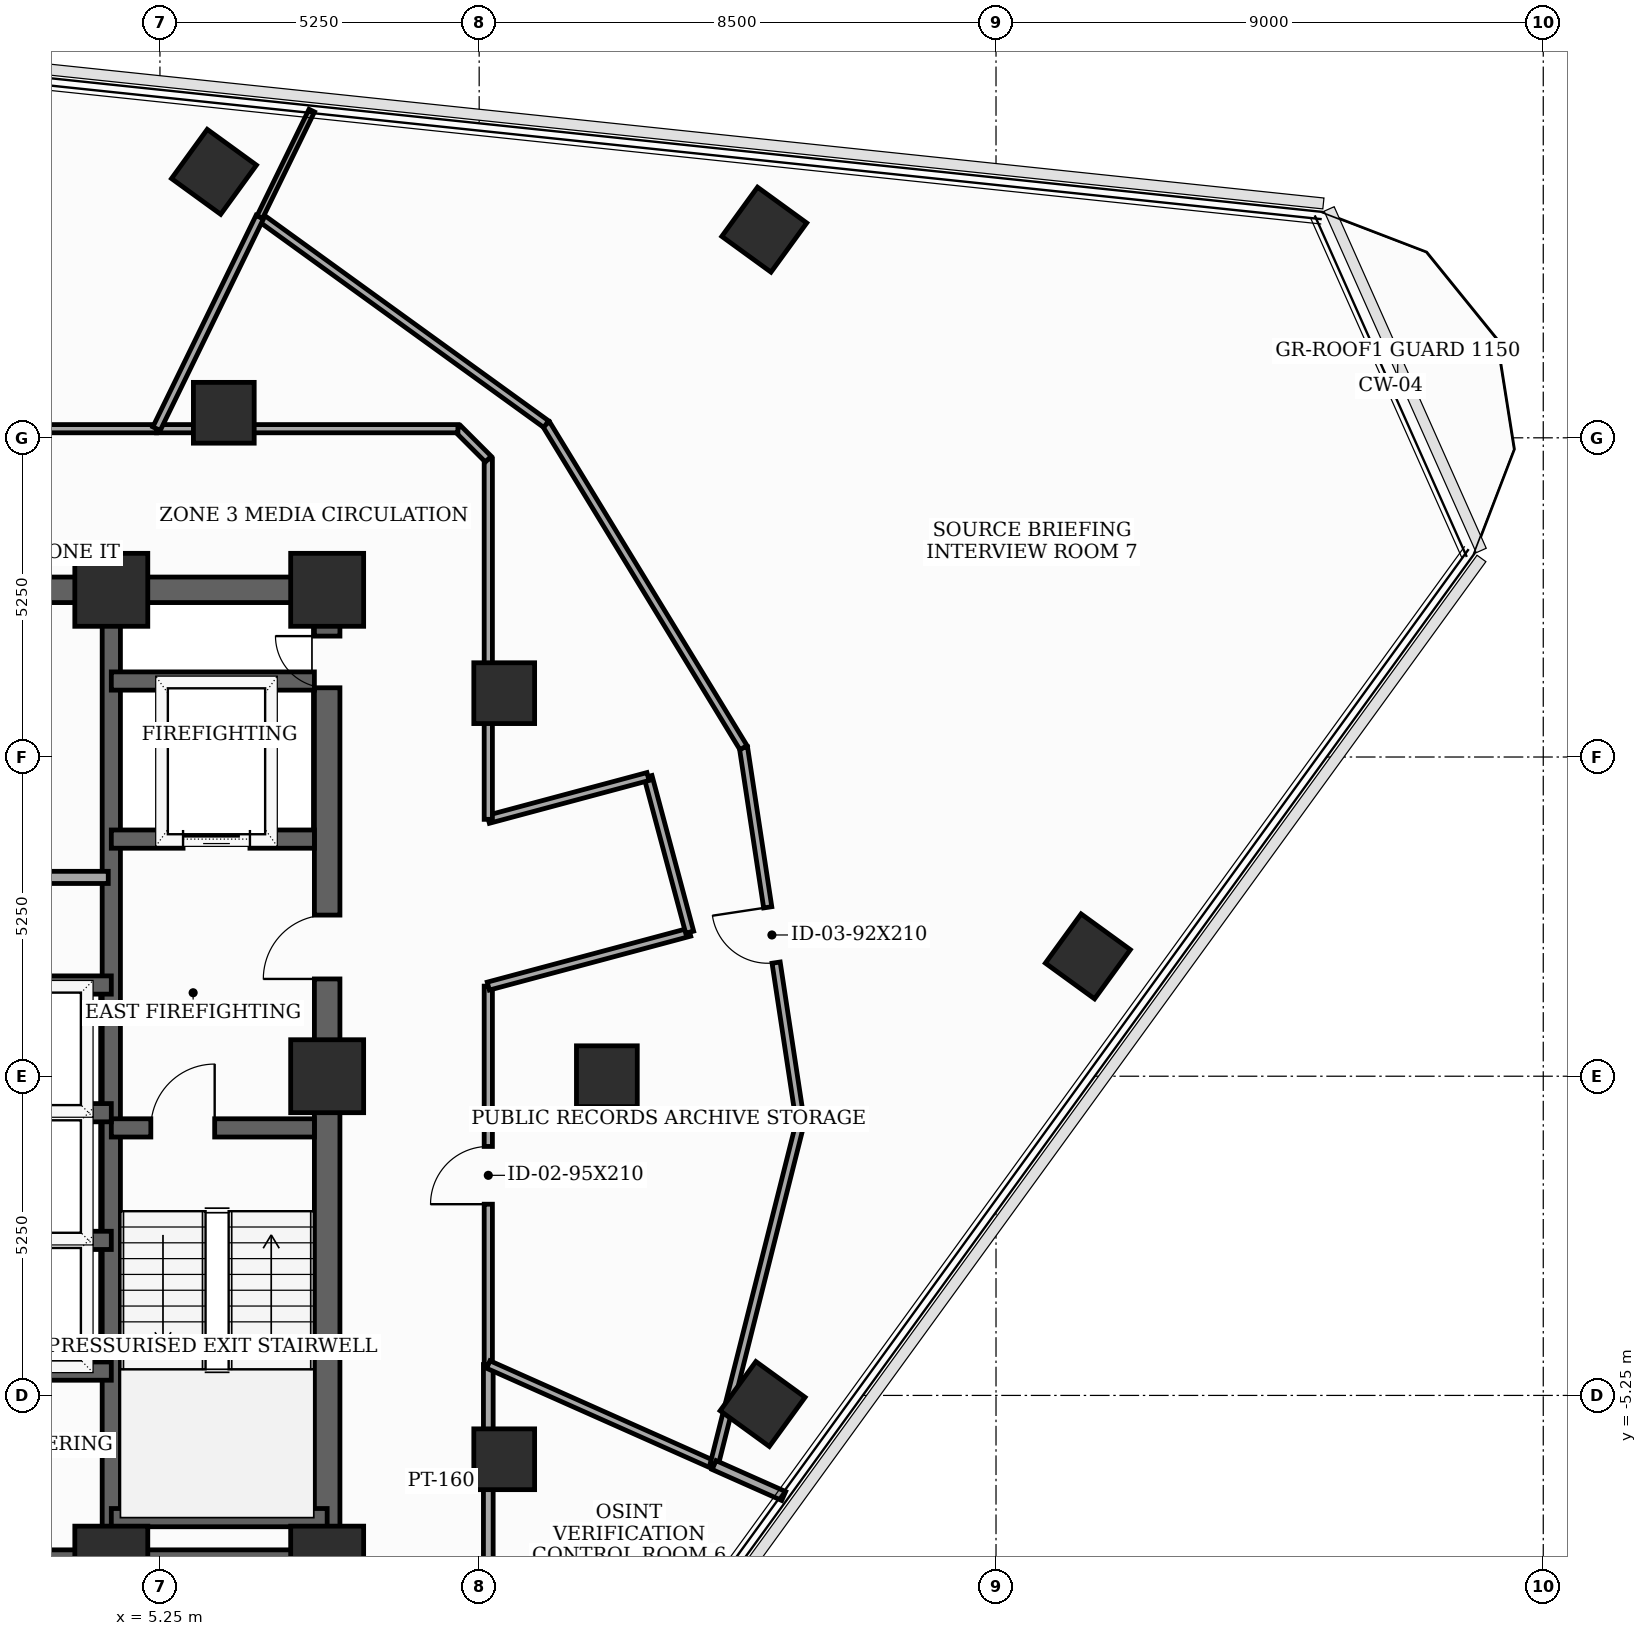
"""IFC4 building model, lengths in metres.
Left out: names, types, materials, properties, quantities, classifications, styles, units other than length and angle.
Written with IfcOpenShell. Run it as: python <this file> out.ifc"""

import sys

from ifc_helpers import new_model, si_unit, direction, frame, frame_2d, origin, origin_2d, place, context, subcontext, project, spatial, rectangle, extrude, element, fill, save


model = new_model("IFC4")
c1 = context("Model", 3, precision=1e-05, world=origin(), true_north=direction((0.0, 1.0)))
c2 = subcontext(c1, "Body", "Model", "MODEL_VIEW")
j1 = project(units=[si_unit("LENGTHUNIT", "METRE"), si_unit("PLANEANGLEUNIT", "RADIAN")], contexts=[c1])
p1 = place(None, origin())
s1 = spatial("IfcSite", under=j1, at=p1, CompositionType="ELEMENT")
p2 = place(p1, origin())
s2 = spatial("IfcBuilding", under=s1, at=p2, CompositionType="ELEMENT")
p3 = place(p2, frame((0.0, 0.0, 233.7)))
s3 = spatial("IfcBuildingStorey", under=s2, at=p3, CompositionType="ELEMENT", Elevation=233.7)
for number, where, z_axis, x_axis in (
    (1, (4.45, -8.0, 0.0), (0.0, 0.0, 1.0), (1.0, 0.0, 0.0)),
    (2, (8.0, -8.0, 0.0), (0.0, 0.0, 1.0), (1.0, 0.0, 0.0)),
    (3, (8.0, 0.0, 0.0), (0.0, 0.0, 1.0), (1.0, 0.0, 0.0)),
    (4, (8.0, 8.0, 0.0), (0.0, 0.0, 1.0), (1.0, 0.0, 0.0)),
    (5, (4.45, 8.0, 0.0), (0.0, 0.0, 1.0), (1.0, 0.0, 0.0)),
):
    element("IfcColumn", number, at=place(p3, frame(where, z_axis=z_axis, x_axis=x_axis)), inside=s3, PredefinedType="COLUMN", context=c2, shape_type="SweptSolid", body=[
        extrude(rectangle(XDim=1.2, YDim=1.2, at=origin_2d()), origin(), (0.0, 0.0, 1.0), 3.7),
    ])
for number, where, z_axis, x_axis in (
    (6, (12.6, 0.0, 0.0), (0.0, 0.0, 1.0), (1.0, 0.0, 0.0)),
    (7, (10.912, 6.3, 0.0), (0.0, 0.0, 1.0), (1.0, 0.0, 0.0)),
    (8, (6.3, 10.912, 0.0), (0.0, 0.0, 1.0), (1.0, 0.0, 0.0)),
    (9, (10.912, -6.3, 0.0), (0.0, 0.0, 1.0), (1.0, 0.0, 0.0)),
    (10, (15.161, -5.391, 0.0), (0.0, 0.0, 1.0), (0.588, 0.809, 0.0)),
    (11, (20.51, 1.971, 0.0), (0.0, 0.0, 1.0), (0.588, 0.809, 0.0)),
    (12, (15.188, 13.923, 0.0), (0.0, 0.0, 1.0), (0.588, 0.809, 0.0)),
    (13, (6.138, 14.875, 0.0), (0.0, 0.0, 1.0), (0.588, 0.809, 0.0)),
):
    element("IfcColumn", number, at=place(p3, frame(where, z_axis=z_axis, x_axis=x_axis)), inside=s3, PredefinedType="COLUMN", context=c2, shape_type="SweptSolid", body=[
        extrude(rectangle(XDim=1.0, YDim=1.0, at=origin_2d()), origin(), (0.0, 0.0, 1.0), 3.7),
    ])
p4 = place(p3, frame((8.0, -8.0, 0.0), z_axis=(0.0, 0.0, 1.0), x_axis=(0.0, 1.0, 0.0)))
e14 = element("IfcWall", 14, at=p4, inside=s3, PredefinedType="SHEAR", context=c2, shape_type="SweptSolid", body=[
    extrude(rectangle(XDim=16.0, YDim=0.42, at=frame_2d((8.0, 0.0))), origin(), (0.0, 0.0, 1.0), 3.5),
])
p5 = place(p4, frame((9.6, 0.0, 0.0)))
e15 = element("IfcOpeningElement", 15, at=p5, cuts=e14, PredefinedType="OPENING", context=c2, shape_type="SweptSolid", body=[
    extrude(rectangle(XDim=1.05, YDim=2.15, at=frame_2d((0.525, 1.075))), frame((0.0, 0.22, 0.0), z_axis=(0.0, -1.0, 0.0), x_axis=(1.0, 0.0, 0.0)), (0.0, 0.0, 1.0), 0.44),
])
p6 = place(p4, frame((14.389, 0.0, 0.0)))
e16 = element("IfcOpeningElement", 16, at=p6, cuts=e14, PredefinedType="OPENING", context=c2, shape_type="SweptSolid", body=[
    extrude(rectangle(XDim=0.85, YDim=2.02, at=frame_2d((0.425, 1.01))), frame((0.0, 0.22, 0.0), z_axis=(0.0, -1.0, 0.0), x_axis=(1.0, 0.0, 0.0)), (0.0, 0.0, 1.0), 0.44),
])
p7 = place(p3, frame((-8.0, -8.0, 0.0), z_axis=(0.0, 0.0, 1.0), x_axis=(1.0, 0.0, 0.0)))
e17 = element("IfcWall", 17, at=p7, inside=s3, PredefinedType="SHEAR", context=c2, shape_type="SweptSolid", body=[
    extrude(rectangle(XDim=16.0, YDim=0.42, at=frame_2d((8.0, 0.0))), origin(), (0.0, 0.0, 1.0), 3.5),
])
p8 = place(p7, frame((4.6, 0.0, 0.0)))
e18 = element("IfcOpeningElement", 18, at=p8, cuts=e17, PredefinedType="OPENING", context=c2, shape_type="SweptSolid", body=[
    extrude(rectangle(XDim=0.95, YDim=2.1, at=frame_2d((0.475, 1.05))), frame((0.0, 0.22, 0.0), z_axis=(0.0, -1.0, 0.0), x_axis=(1.0, 0.0, 0.0)), (0.0, 0.0, 1.0), 0.44),
])
p9 = place(p7, frame((7.52, 0.0, 0.0)))
e19 = element("IfcOpeningElement", 19, at=p9, cuts=e17, PredefinedType="OPENING", context=c2, shape_type="SweptSolid", body=[
    extrude(rectangle(XDim=0.95, YDim=2.1, at=frame_2d((0.475, 1.05))), frame((0.0, 0.22, 0.0), z_axis=(0.0, -1.0, 0.0), x_axis=(1.0, 0.0, 0.0)), (0.0, 0.0, 1.0), 0.44),
])
p10 = place(p7, frame((10.45, 0.0, 0.0)))
e20 = element("IfcOpeningElement", 20, at=p10, cuts=e17, PredefinedType="OPENING", context=c2, shape_type="SweptSolid", body=[
    extrude(rectangle(XDim=0.95, YDim=2.1, at=frame_2d((0.475, 1.05))), frame((0.0, 0.22, 0.0), z_axis=(0.0, -1.0, 0.0), x_axis=(1.0, 0.0, 0.0)), (0.0, 0.0, 1.0), 0.44),
])
p11 = place(p3, frame((-8.0, 8.0, 0.0), z_axis=(0.0, 0.0, 1.0), x_axis=(1.0, 0.0, 0.0)))
e21 = element("IfcWall", 21, at=p11, inside=s3, PredefinedType="SHEAR", context=c2, shape_type="SweptSolid", body=[
    extrude(rectangle(XDim=16.0, YDim=0.42, at=frame_2d((8.0, 0.0))), origin(), (0.0, 0.0, 1.0), 3.5),
])
p12 = place(p11, frame((7.1, 0.0, 0.0)))
e22 = element("IfcOpeningElement", 22, at=p12, cuts=e21, PredefinedType="OPENING", context=c2, shape_type="SweptSolid", body=[
    extrude(rectangle(XDim=1.8, YDim=2.15, at=frame_2d((0.9, 1.075))), frame((0.0, 0.22, 0.0), z_axis=(0.0, -1.0, 0.0), x_axis=(1.0, 0.0, 0.0)), (0.0, 0.0, 1.0), 0.44),
])
p13 = place(p3, frame((4.45, -7.79, 0.0), z_axis=(0.0, 0.0, 1.0), x_axis=(0.0, 1.0, 0.0)))
e23 = element("IfcWall", 23, at=p13, inside=s3, PredefinedType="SHEAR", context=c2, shape_type="SweptSolid", body=[
    extrude(rectangle(XDim=15.58, YDim=0.3, at=frame_2d((7.79, 0.0))), origin(), (0.0, 0.0, 1.0), 3.5),
])
p14 = place(p3, frame((4.45, -0.85, 0.0), z_axis=(0.0, 0.0, 1.0), x_axis=(1.0, 0.0, 0.0)))
e24 = element("IfcWall", 24, at=p14, inside=s3, PredefinedType="SHEAR", context=c2, shape_type="SweptSolid", body=[
    extrude(rectangle(XDim=3.34, YDim=0.3, at=frame_2d((1.67, 0.0))), origin(), (0.0, 0.0, 1.0), 3.5),
])
p15 = place(p14, frame((0.65, 0.0, 0.0)))
e25 = element("IfcOpeningElement", 25, at=p15, cuts=e24, PredefinedType="OPENING", context=c2, shape_type="SweptSolid", body=[
    extrude(rectangle(XDim=1.05, YDim=2.15, at=frame_2d((0.525, 1.075))), frame((0.0, 0.16, 0.0), z_axis=(0.0, -1.0, 0.0), x_axis=(1.0, 0.0, 0.0)), (0.0, 0.0, 1.0), 0.32),
])
p16 = place(p3, frame((4.45, -7.26, 0.0), z_axis=(0.0, 0.0, 1.0), x_axis=(1.0, 0.0, 0.0)))
e26 = element("IfcWall", 26, at=p16, inside=s3, PredefinedType="SHEAR", context=c2, shape_type="SweptSolid", body=[
    extrude(rectangle(XDim=3.55, YDim=0.3, at=frame_2d((1.775, 0.0))), origin(), (0.0, 0.0, 1.0), 3.5),
])
p17 = place(p3, frame((4.45, 3.9, 0.0), z_axis=(0.0, 0.0, 1.0), x_axis=(1.0, 0.0, 0.0)))
e27 = element("IfcWall", 27, at=p17, inside=s3, PredefinedType="SHEAR", context=c2, shape_type="SweptSolid", body=[
    extrude(rectangle(XDim=3.34, YDim=0.3, at=frame_2d((1.67, 0.0))), origin(), (0.0, 0.0, 1.0), 3.5),
])
p18 = place(p17, frame((1.18, 0.0, 0.0)))
e28 = element("IfcOpeningElement", 28, at=p18, cuts=e27, PredefinedType="OPENING", context=c2, shape_type="SweptSolid", body=[
    extrude(rectangle(XDim=1.1, YDim=2.1, at=frame_2d((0.55, 1.05))), frame((0.0, 0.16, 0.0), z_axis=(0.0, -1.0, 0.0), x_axis=(1.0, 0.0, 0.0)), (0.0, 0.0, 1.0), 0.32),
])
p19 = place(p3, frame((4.45, 6.5, 0.0), z_axis=(0.0, 0.0, 1.0), x_axis=(1.0, 0.0, 0.0)))
e29 = element("IfcWall", 29, at=p19, inside=s3, PredefinedType="SHEAR", context=c2, shape_type="SweptSolid", body=[
    extrude(rectangle(XDim=3.34, YDim=0.3, at=frame_2d((1.67, 0.0))), origin(), (0.0, 0.0, 1.0), 3.5),
])
p20 = place(p3, frame((-4.45, -4.85, 0.0), z_axis=(0.0, 0.0, 1.0), x_axis=(1.0, 0.0, 0.0)))
e30 = element("IfcWall", 30, at=p20, inside=s3, PredefinedType="SHEAR", context=c2, shape_type="SweptSolid", body=[
    extrude(rectangle(XDim=8.9, YDim=0.3, at=frame_2d((4.45, 0.0))), origin(), (0.0, 0.0, 1.0), 3.5),
])
for number, where, z_axis, x_axis in (
    (31, (1.68, 1.5, 0.0), (0.0, 0.0, 1.0), (1.0, 0.0, 0.0)),
    (32, (1.68, -2.7, 0.0), (0.0, 0.0, 1.0), (1.0, 0.0, 0.0)),
    (33, (1.68, -0.6, 0.0), (0.0, 0.0, 1.0), (1.0, 0.0, 0.0)),
):
    element("IfcWall", number, at=place(p3, frame(where, z_axis=z_axis, x_axis=x_axis)), inside=s3, PredefinedType="SHEAR", context=c2, shape_type="SweptSolid", body=[
        extrude(rectangle(XDim=2.77, YDim=0.3, at=frame_2d((1.385, 0.0))), origin(), (0.0, 0.0, 1.0), 3.5),
    ])
p21 = place(p3, frame((1.72, 3.27, 0.0), z_axis=(0.0, 0.0, 1.0), x_axis=(1.0, 0.0, 0.0)))
e34 = element("IfcWall", 34, at=p21, inside=s3, PredefinedType="SOLIDWALL", context=c2, shape_type="SweptSolid", body=[
    extrude(rectangle(XDim=2.68, YDim=0.2, at=frame_2d((1.34, 0.0))), origin(), (0.0, 0.0, 1.0), 3.5),
])
p22 = place(p3, frame((10.65, -4.742, 0.0), z_axis=(0.0, 0.0, 1.0), x_axis=(0.0, 1.0, 0.0)))
e35 = element("IfcWall", 35, at=p22, inside=s3, PredefinedType="PARTITIONING", context=c2, shape_type="SweptSolid", body=[
    extrude(rectangle(XDim=6.224, YDim=0.135, at=frame_2d((3.112, 0.0))), origin(), (0.0, 0.0, 1.0), 2.885),
])
p23 = place(p22, frame((2.637, 0.0, 0.0)))
e36 = element("IfcOpeningElement", 36, at=p23, cuts=e35, PredefinedType="OPENING", context=c2, shape_type="SweptSolid", body=[
    extrude(rectangle(XDim=0.95, YDim=2.1, at=frame_2d((0.475, 1.05))), frame((0.0, 0.077, 0.0), z_axis=(0.0, -1.0, 0.0), x_axis=(1.0, 0.0, 0.0)), (0.0, 0.0, 1.0), 0.155),
])
p24 = place(p3, frame((10.65, 1.482, 0.0), z_axis=(0.0, 0.0, 1.0), x_axis=(0.965961397105, 0.2586862565, 0.0)))
e37 = element("IfcWall", 37, at=p24, inside=s3, PredefinedType="PARTITIONING", context=c2, shape_type="SweptSolid", body=[
    extrude(rectangle(XDim=3.429, YDim=0.135, at=frame_2d((1.714, 0.0))), origin(), (0.0, 0.0, 1.0), 2.885),
])
p25 = place(p3, frame((13.962, 2.369, 0.0), z_axis=(0.0, 0.0, 1.0), x_axis=(-0.258413725385, 0.966034340245, 0.0)))
e38 = element("IfcWall", 38, at=p25, inside=s3, PredefinedType="PARTITIONING", context=c2, shape_type="SweptSolid", body=[
    extrude(rectangle(XDim=2.65, YDim=0.135, at=frame_2d((1.325, 0.0))), origin(), (0.0, 0.0, 1.0), 3.5),
])
p26 = place(p3, frame((13.277, 4.929, 0.0), z_axis=(0.0, 0.0, 1.0), x_axis=(-0.965934830229, -0.258785439601, 0.0)))
e39 = element("IfcWall", 39, at=p26, inside=s3, PredefinedType="PARTITIONING", context=c2, shape_type="SweptSolid", body=[
    extrude(rectangle(XDim=2.72, YDim=0.135, at=frame_2d((1.36, 0.0))), origin(), (0.0, 0.0, 1.0), 2.885),
])
p27 = place(p3, frame((10.65, 4.225, 0.0), z_axis=(0.0, 0.0, 1.0), x_axis=(0.0, 1.0, 0.0)))
e40 = element("IfcWall", 40, at=p27, inside=s3, PredefinedType="PARTITIONING", context=c2, shape_type="SweptSolid", body=[
    extrude(rectangle(XDim=5.925, YDim=0.135, at=frame_2d((2.962, 0.0))), origin(), (0.0, 0.0, 1.0), 2.885),
])
p28 = place(p3, frame((10.65, 10.15, 0.0), z_axis=(0.0, 0.0, 1.0), x_axis=(-0.707106781187, 0.707106781187, 0.0)))
e41 = element("IfcWall", 41, at=p28, inside=s3, PredefinedType="PARTITIONING", context=c2, shape_type="SweptSolid", body=[
    extrude(rectangle(XDim=0.707, YDim=0.135, at=frame_2d((0.354, 0.0))), origin(), (0.0, 0.0, 1.0), 3.5),
])
p29 = place(p3, frame((10.15, 10.65, 0.0), z_axis=(0.0, 0.0, 1.0), x_axis=(-1.0, 0.0, 0.0)))
e42 = element("IfcWall", 42, at=p29, inside=s3, PredefinedType="PARTITIONING", context=c2, shape_type="SweptSolid", body=[
    extrude(rectangle(XDim=4.956, YDim=0.135, at=frame_2d((2.478, 0.0))), origin(), (0.0, 0.0, 1.0), 2.885),
])
p30 = place(p3, frame((10.65, -10.15, 0.0), z_axis=(0.0, 0.0, 1.0), x_axis=(0.0, 1.0, 0.0)))
e43 = element("IfcWall", 43, at=p30, inside=s3, PredefinedType="PARTITIONING", context=c2, shape_type="SweptSolid", body=[
    extrude(rectangle(XDim=5.408, YDim=0.16, at=frame_2d((2.704, 0.0))), origin(), (0.0, 0.0, 1.0), 2.885),
])
p31 = place(p30, frame((0.582, 0.0, 0.0)))
e44 = element("IfcOpeningElement", 44, at=p31, cuts=e43, PredefinedType="OPENING", context=c2, shape_type="SweptSolid", body=[
    extrude(rectangle(XDim=1.0, YDim=2.15, at=frame_2d((0.5, 1.075))), frame((0.0, 0.09, 0.0), z_axis=(0.0, -1.0, 0.0), x_axis=(1.0, 0.0, 0.0)), (0.0, 0.0, 1.0), 0.18),
])
p32 = place(p3, frame((5.194, 10.65, 0.0), z_axis=(0.0, 0.0, 1.0), x_axis=(-1.0, 0.0, 0.0)))
e45 = element("IfcWall", 45, at=p32, inside=s3, PredefinedType="PARTITIONING", context=c2, shape_type="SweptSolid", body=[
    extrude(rectangle(XDim=6.344, YDim=0.135, at=frame_2d((3.172, 0.0))), origin(), (0.0, 0.0, 1.0), 2.885),
])
p33 = place(p32, frame((2.372, 0.0, 0.0)))
e46 = element("IfcOpeningElement", 46, at=p33, cuts=e45, PredefinedType="OPENING", context=c2, shape_type="SweptSolid", body=[
    extrude(rectangle(XDim=1.6, YDim=2.15, at=frame_2d((0.8, 1.075))), frame((0.0, 0.077, 0.0), z_axis=(0.0, -1.0, 0.0), x_axis=(1.0, 0.0, 0.0)), (0.0, 0.0, 1.0), 0.155),
])
p34 = place(p3, frame((10.65, -4.742, 0.0), z_axis=(0.0, 0.0, 1.0), x_axis=(0.913556239153, -0.406712426544, 0.0)))
e47 = element("IfcWall", 47, at=p34, inside=s3, PredefinedType="PARTITIONING", context=c2, shape_type="SweptSolid", body=[
    extrude(rectangle(XDim=4.064, YDim=0.135, at=frame_2d((2.032, 0.0))), origin(), (0.0, 0.0, 1.0), 2.885),
])
p35 = place(p3, frame((14.363, -6.395, 0.0), z_axis=(0.0, 0.0, 1.0), x_axis=(0.244106617879, 0.969748399899, 0.0)))
e48 = element("IfcWall", 48, at=p35, inside=s3, PredefinedType="PARTITIONING", context=c2, shape_type="SweptSolid", body=[
    extrude(rectangle(XDim=5.813, YDim=0.135, at=frame_2d((2.906, 0.0))), origin(), (0.0, 0.0, 1.0), 2.985),
])
p36 = place(p3, frame((15.782, -0.758, 0.0), z_axis=(0.0, 0.0, 1.0), x_axis=(-0.150025845784, 0.988682075086, 0.0)))
e49 = element("IfcWall", 49, at=p36, inside=s3, PredefinedType="PARTITIONING", context=c2, shape_type="SweptSolid", body=[
    extrude(rectangle(XDim=6.233, YDim=0.135, at=frame_2d((3.116, 0.0))), origin(), (0.0, 0.0, 1.0), 2.985),
])
p37 = place(p36, frame((2.656, 0.0, 0.0)))
e50 = element("IfcOpeningElement", 50, at=p37, cuts=e49, PredefinedType="OPENING", context=c2, shape_type="SweptSolid", body=[
    extrude(rectangle(XDim=0.92, YDim=2.1, at=frame_2d((0.46, 1.05))), frame((0.0, 0.077, 0.0), z_axis=(0.0, -1.0, 0.0), x_axis=(1.0, 0.0, 0.0)), (0.0, 0.0, 1.0), 0.155),
])
p38 = place(p3, frame((14.847, 5.404, 0.0), z_axis=(0.0, 0.0, 1.0), x_axis=(-0.520646426704, 0.853772392597, 0.0)))
e51 = element("IfcWall", 51, at=p38, inside=s3, PredefinedType="PARTITIONING", context=c2, shape_type="SweptSolid", body=[
    extrude(rectangle(XDim=6.232, YDim=0.135, at=frame_2d((3.116, 0.0))), origin(), (0.0, 0.0, 1.0), 2.985),
])
p39 = place(p3, frame((11.602, 10.725, 0.0), z_axis=(0.0, 0.0, 1.0), x_axis=(-0.810322435649, 0.58598425771, 0.0)))
e52 = element("IfcWall", 52, at=p39, inside=s3, PredefinedType="PARTITIONING", context=c2, shape_type="SweptSolid", body=[
    extrude(rectangle(XDim=5.812, YDim=0.135, at=frame_2d((2.906, 0.0))), origin(), (0.0, 0.0, 1.0), 3.5),
])
p40 = place(p3, frame((6.892, 14.131, 0.0), z_axis=(0.0, 0.0, 1.0), x_axis=(-0.438392584888, -0.898783589923, 0.0)))
e53 = element("IfcWall", 53, at=p40, inside=s3, PredefinedType="PARTITIONING", context=c2, shape_type="SweptSolid", body=[
    extrude(rectangle(XDim=3.873, YDim=0.135, at=frame_2d((1.937, 0.0))), origin(), (0.0, 0.0, 1.0), 2.885),
])
p41 = place(p3, frame((15.508, -6.905, 0.0), z_axis=(0.0, 0.0, 1.0), x_axis=(-0.913626692327, 0.406554137929, 0.0)))
e54 = element("IfcWall", 54, at=p41, inside=s3, PredefinedType="PARTITIONING", context=c2, shape_type="SweptSolid", body=[
    extrude(rectangle(XDim=1.253, YDim=0.16, at=frame_2d((0.626, 0.0))), origin(), (0.0, 0.0, 1.0), 3.035),
])
p42 = place(p3, frame((7.747, 15.882, 0.0), z_axis=(0.0, 0.0, 1.0), x_axis=(-0.438571753549, -0.898696176129, 0.0)))
e55 = element("IfcWall", 55, at=p42, inside=s3, PredefinedType="MOVABLE", context=c2, shape_type="SweptSolid", body=[
    extrude(rectangle(XDim=1.948, YDim=0.1, at=frame_2d((0.974, 0.0))), origin(), (0.0, 0.0, 1.0), 3.035),
])
p43 = place(p5, origin())
e56 = element("IfcDoor", 56, at=p43, inside=s3, OperationType="SINGLE_SWING_LEFT", PredefinedType="DOOR", context=c2, shape_type="SweptSolid", body=[
    extrude(rectangle(XDim=1.05, YDim=2.15, at=frame_2d((0.525, 1.075))), frame((0.0, 0.025, 0.0), z_axis=(0.0, -1.0, 0.0), x_axis=(1.0, 0.0, 0.0)), (0.0, 0.0, 1.0), 0.05),
])
fill(e15, e56)
p44 = place(p6, origin())
e57 = element("IfcDoor", 57, at=p44, inside=s3, OperationType="SINGLE_SWING_RIGHT", PredefinedType="TRAPDOOR", context=c2, shape_type="SweptSolid", body=[
    extrude(rectangle(XDim=0.85, YDim=2.02, at=frame_2d((0.425, 1.01))), frame((0.0, 0.025, 0.0), z_axis=(0.0, -1.0, 0.0), x_axis=(1.0, 0.0, 0.0)), (0.0, 0.0, 1.0), 0.05),
])
fill(e16, e57)
p45 = place(p15, origin())
e58 = element("IfcDoor", 58, at=p45, inside=s3, OperationType="SINGLE_SWING_RIGHT", PredefinedType="DOOR", context=c2, shape_type="SweptSolid", body=[
    extrude(rectangle(XDim=1.05, YDim=2.15, at=frame_2d((0.525, 1.075))), frame((0.0, 0.025, 0.0), z_axis=(0.0, -1.0, 0.0), x_axis=(1.0, 0.0, 0.0)), (0.0, 0.0, 1.0), 0.05),
])
fill(e25, e58)
p46 = place(p18, origin())
e59 = element("IfcDoor", 59, at=p46, inside=s3, OperationType="SLIDING_TO_LEFT", PredefinedType="DOOR", context=c2, shape_type="SweptSolid", body=[
    extrude(rectangle(XDim=1.1, YDim=2.1, at=frame_2d((0.55, 1.05))), frame((0.0, 0.025, 0.0), z_axis=(0.0, -1.0, 0.0), x_axis=(1.0, 0.0, 0.0)), (0.0, 0.0, 1.0), 0.05),
])
fill(e28, e59)
p47 = place(p23, origin())
e60 = element("IfcDoor", 60, at=p47, inside=s3, OperationType="SINGLE_SWING_LEFT", PredefinedType="DOOR", context=c2, shape_type="SweptSolid", body=[
    extrude(rectangle(XDim=0.95, YDim=2.1, at=frame_2d((0.475, 1.05))), frame((0.0, 0.025, 0.0), z_axis=(0.0, -1.0, 0.0), x_axis=(1.0, 0.0, 0.0)), (0.0, 0.0, 1.0), 0.05),
])
fill(e36, e60)
p48 = place(p37, origin())
e61 = element("IfcDoor", 61, at=p48, inside=s3, OperationType="SINGLE_SWING_RIGHT", PredefinedType="DOOR", context=c2, shape_type="SweptSolid", body=[
    extrude(rectangle(XDim=0.92, YDim=2.1, at=frame_2d((0.46, 1.05))), frame((0.0, 0.025, 0.0), z_axis=(0.0, -1.0, 0.0), x_axis=(1.0, 0.0, 0.0)), (0.0, 0.0, 1.0), 0.05),
])
fill(e50, e61)
save(model, sys.argv[1])
